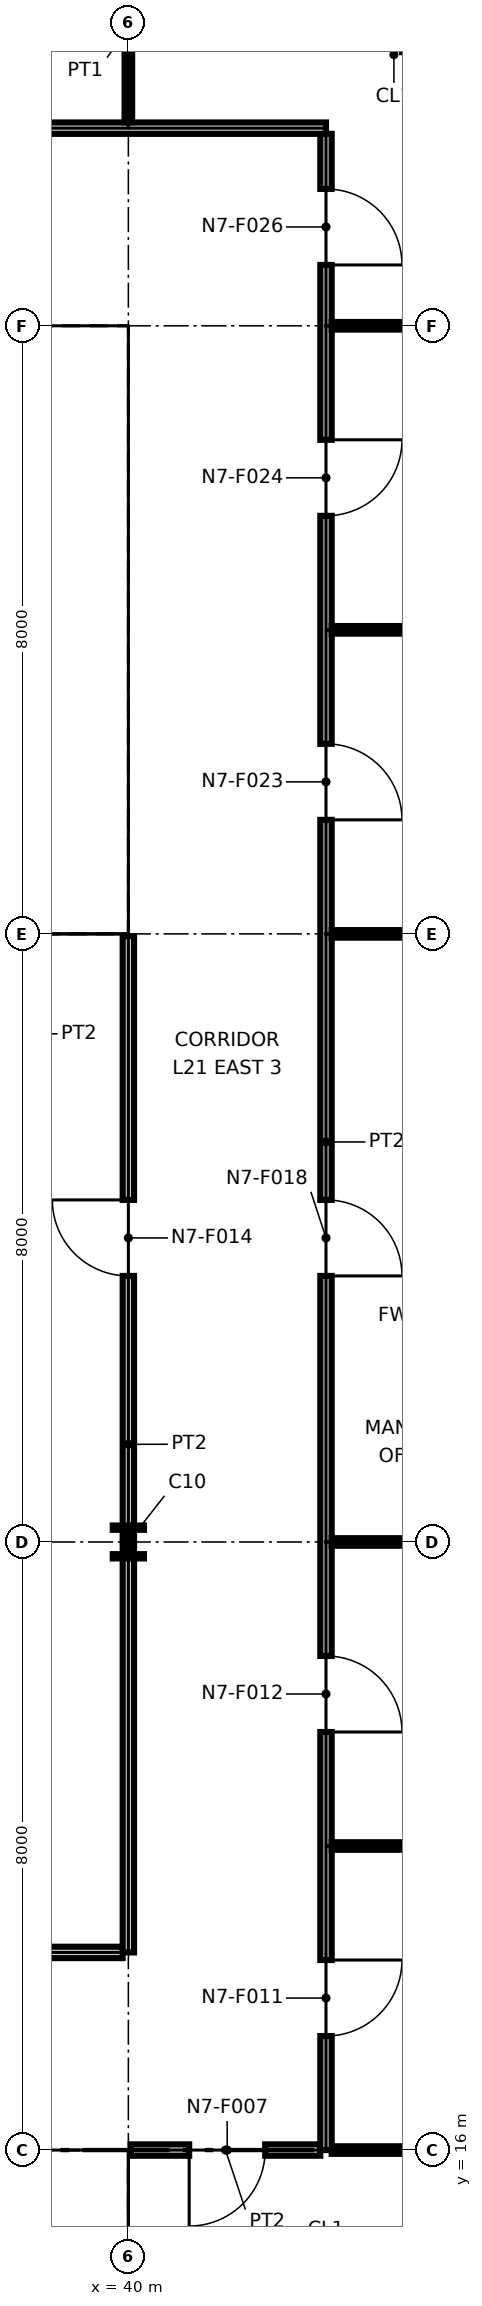
"""IFC4 building model, lengths in metres.
Left out: names, types, materials, properties, quantities, classifications, styles, units other than length and angle.
Written with IfcOpenShell. Run it as: python <this file> out.ifc"""

import sys

from ifc_helpers import new_model, si_unit, direction, frame, frame_2d, origin, origin_2d, place, context, subcontext, project, spatial, polyline, rectangle, i_section, outline, extrude, element, fill, save


model = new_model("IFC4")
c1 = context("Model", 3, precision=1e-05, world=origin(), true_north=direction((0.0, 1.0)))
c2 = subcontext(c1, "Body", "Model", "MODEL_VIEW")
j1 = project(units=[si_unit("LENGTHUNIT", "METRE"), si_unit("PLANEANGLEUNIT", "RADIAN")], contexts=[c1])
p1 = place(None, origin())
s1 = spatial("IfcSite", under=j1, at=p1, CompositionType="ELEMENT")
p2 = place(p1, origin())
s2 = spatial("IfcBuilding", under=s1, at=p2, CompositionType="ELEMENT")
p3 = place(p2, frame((0.0, 0.0, 109.6)))
s3 = spatial("IfcBuildingStorey", under=s2, at=p3, CompositionType="ELEMENT", Elevation=109.6)
p4 = place(p3, frame((40.0, 16.0, 0.0), z_axis=(0.0, 0.0, 1.0), x_axis=(1.0, 0.0, 0.0)))
e1 = element("IfcColumn", 1, at=p4, inside=s3, PredefinedType="COLUMN", context=c2, shape_type="SweptSolid", body=[
    extrude(i_section(OverallWidth=0.406, OverallDepth=0.417, WebThickness=0.03, FlangeThickness=0.048, at=origin_2d()), origin(), (0.0, 0.0, 1.0), 4.15),
])
p5 = place(p3, frame((40.0, 24.0, 0.0), z_axis=(0.0, 0.0, 1.0), x_axis=(1.0, 0.0, 0.0)))
e2 = element("IfcColumn", 2, at=p5, inside=s3, PredefinedType="COLUMN", context=c2, shape_type="SweptSolid", body=[
    extrude(i_section(OverallWidth=0.411, OverallDepth=0.434, WebThickness=0.036, FlangeThickness=0.057, at=origin_2d()), origin(), (0.0, 0.0, 1.0), 4.15),
])
for number, where, z_axis, x_axis in (
    (3, (40.0, 32.0, 0.0), (0.0, 0.0, 1.0), (1.0, 0.0, 0.0)),
    (4, (40.0, 40.0, 0.0), (0.0, 0.0, 1.0), (1.0, 0.0, 0.0)),
):
    element("IfcColumn", number, at=place(p3, frame(where, z_axis=z_axis, x_axis=x_axis)), inside=s3, PredefinedType="COLUMN", context=c2, shape_type="SweptSolid", body=[
        extrude(i_section(OverallWidth=0.257, OverallDepth=0.363, WebThickness=0.013, FlangeThickness=0.022, at=origin_2d()), origin(), (0.0, 0.0, 1.0), 4.15),
    ])
p6 = place(p3, frame((24.65, 15.25, 0.0), z_axis=(0.0, 0.0, 1.0), x_axis=(1.0, 0.0, 0.0)))
e5 = element("IfcWall", 5, at=p6, inside=s3, PredefinedType="PARTITIONING", context=c2, shape_type="SweptSolid", body=[
    extrude(outline(polyline([(0.0, 0.0), (14.7, 0.0), (14.7, 4.15), (7.489, 4.15), (7.488, 3.382), (7.212, 3.382), (7.211, 4.15), (0.0, 4.15), (0.0, 0.0)])), frame((0.0, 0.1, 0.0), z_axis=(0.0, -1.0, 0.0), x_axis=(1.0, 0.0, 0.0)), (0.0, 0.0, 1.0), 0.2),
])
p7 = place(p6, frame((2.85, 0.0, 0.0)))
e6 = element("IfcOpeningElement", 6, at=p7, cuts=e5, PredefinedType="OPENING", context=c2, shape_type="SweptSolid", body=[
    extrude(rectangle(XDim=1.8, YDim=2.1, at=frame_2d((0.9, 1.05))), frame((0.0, 0.11, 0.0), z_axis=(0.0, -1.0, 0.0), x_axis=(1.0, 0.0, 0.0)), (0.0, 0.0, 1.0), 0.22),
])
p8 = place(p6, frame((9.95, 0.0, 0.0), z_axis=(0.0, 0.0, 1.0), x_axis=(-1.0, 0.0, 0.0)))
e7 = element("IfcOpeningElement", 7, at=p8, cuts=e5, PredefinedType="OPENING", context=c2, shape_type="SweptSolid", body=[
    extrude(rectangle(XDim=1.4, YDim=2.1, at=frame_2d((0.7, 1.05))), frame((0.0, 0.11, 0.0), z_axis=(0.0, -1.0, 0.0), x_axis=(1.0, 0.0, 0.0)), (0.0, 0.0, 1.0), 0.22),
])
p9 = place(p6, frame((13.4, 0.0, 0.0), z_axis=(0.0, 0.0, 1.0), x_axis=(-1.0, 0.0, 0.0)))
e8 = element("IfcOpeningElement", 8, at=p9, cuts=e5, PredefinedType="OPENING", context=c2, shape_type="SweptSolid", body=[
    extrude(rectangle(XDim=1.4, YDim=2.1, at=frame_2d((0.7, 1.05))), frame((0.0, 0.11, 0.0), z_axis=(0.0, -1.0, 0.0), x_axis=(1.0, 0.0, 0.0)), (0.0, 0.0, 1.0), 0.22),
])
p10 = place(p3, frame((39.25, 8.85, 0.0), z_axis=(0.0, 0.0, 1.0), x_axis=(0.0, 1.0, 0.0)))
e9 = element("IfcWall", 9, at=p10, inside=s3, PredefinedType="PARTITIONING", context=c2, shape_type="SweptSolid", body=[
    extrude(rectangle(XDim=6.3, YDim=0.2, at=frame_2d((3.15, 0.0))), origin(), (0.0, 0.0, 1.0), 4.15),
])
p11 = place(p3, frame((24.65, 32.75, 0.0), z_axis=(0.0, 0.0, 1.0), x_axis=(1.0, 0.0, 0.0)))
e10 = element("IfcWall", 10, at=p11, inside=s3, PredefinedType="PARTITIONING", context=c2, shape_type="SweptSolid", body=[
    extrude(outline(polyline([(0.0, 0.0), (14.7, 0.0), (14.7, 4.15), (7.489, 4.15), (7.488, 3.382), (7.212, 3.382), (7.211, 4.15), (0.0, 4.15), (0.0, 0.0)])), frame((0.0, 0.1, 0.0), z_axis=(0.0, -1.0, 0.0), x_axis=(1.0, 0.0, 0.0)), (0.0, 0.0, 1.0), 0.2),
])
p12 = place(p11, frame((4.1, 0.0, 0.0)))
e11 = element("IfcOpeningElement", 11, at=p12, cuts=e10, PredefinedType="OPENING", context=c2, shape_type="SweptSolid", body=[
    extrude(rectangle(XDim=1.8, YDim=2.1, at=frame_2d((0.9, 1.05))), frame((0.0, 0.11, 0.0), z_axis=(0.0, -1.0, 0.0), x_axis=(1.0, 0.0, 0.0)), (0.0, 0.0, 1.0), 0.22),
])
p13 = place(p11, frame((8.55, 0.0, 0.0)))
e12 = element("IfcOpeningElement", 12, at=p13, cuts=e10, PredefinedType="OPENING", context=c2, shape_type="SweptSolid", body=[
    extrude(rectangle(XDim=1.4, YDim=2.1, at=frame_2d((0.7, 1.05))), frame((0.0, 0.11, 0.0), z_axis=(0.0, -1.0, 0.0), x_axis=(1.0, 0.0, 0.0)), (0.0, 0.0, 1.0), 0.22),
])
p14 = place(p11, frame((12.0, 0.0, 0.0)))
e13 = element("IfcOpeningElement", 13, at=p14, cuts=e10, PredefinedType="OPENING", context=c2, shape_type="SweptSolid", body=[
    extrude(rectangle(XDim=1.4, YDim=2.1, at=frame_2d((0.7, 1.05))), frame((0.0, 0.11, 0.0), z_axis=(0.0, -1.0, 0.0), x_axis=(1.0, 0.0, 0.0)), (0.0, 0.0, 1.0), 0.22),
])
p15 = place(p3, frame((24.65, 39.25, 0.0), z_axis=(0.0, 0.0, 1.0), x_axis=(1.0, 0.0, 0.0)))
e14 = element("IfcWall", 14, at=p15, inside=s3, PredefinedType="PARTITIONING", context=c2, shape_type="SweptSolid", body=[
    extrude(outline(polyline([(0.0, 0.0), (14.7, 0.0), (14.7, 4.15), (7.489, 4.15), (7.488, 3.382), (7.212, 3.382), (7.211, 4.15), (0.0, 4.15), (0.0, 0.0)])), frame((0.0, 0.1, 0.0), z_axis=(0.0, -1.0, 0.0), x_axis=(1.0, 0.0, 0.0)), (0.0, 0.0, 1.0), 0.2),
])
p16 = place(p3, frame((39.25, 32.85, 0.0), z_axis=(0.0, 0.0, 1.0), x_axis=(0.0, 1.0, 0.0)))
e15 = element("IfcWall", 15, at=p16, inside=s3, PredefinedType="PARTITIONING", context=c2, shape_type="SweptSolid", body=[
    extrude(rectangle(XDim=6.3, YDim=0.2, at=frame_2d((3.15, 0.0))), origin(), (0.0, 0.0, 1.0), 4.15),
])
p17 = place(p3, frame((40.03, 16.0, 0.0), z_axis=(0.0, 0.0, 1.0), x_axis=(1.0, 0.0, 0.0)))
e16 = element("IfcWall", 16, at=p17, inside=s3, PredefinedType="PARTITIONING", context=c2, shape_type="SweptSolid", body=[
    extrude(rectangle(XDim=2.495, YDim=0.15, at=frame_2d((1.248, 0.0))), origin(), (0.0, 0.0, 1.0), 3.194),
])
p18 = place(p17, frame((1.77, 0.0, 0.0), z_axis=(0.0, 0.0, 1.0), x_axis=(-1.0, 0.0, 0.0)))
e17 = element("IfcOpeningElement", 17, at=p18, cuts=e16, PredefinedType="OPENING", context=c2, shape_type="SweptSolid", body=[
    extrude(rectangle(XDim=1.0, YDim=2.1, at=frame_2d((0.5, 1.05))), frame((0.0, 0.085, 0.0), z_axis=(0.0, -1.0, 0.0), x_axis=(1.0, 0.0, 0.0)), (0.0, 0.0, 1.0), 0.17),
])
p19 = place(p3, frame((42.675, 16.0, 0.0), z_axis=(0.0, 0.0, 1.0), x_axis=(1.0, 0.0, 0.0)))
e18 = element("IfcWall", 18, at=p19, inside=s3, PredefinedType="PARTITIONING", context=c2, shape_type="SweptSolid", body=[
    extrude(rectangle(XDim=2.495, YDim=0.1, at=frame_2d((1.248, 0.0))), origin(), (0.0, 0.0, 1.0), 3.194),
])
p20 = place(p3, frame((42.6, 16.0, 0.0), z_axis=(0.0, 0.0, 1.0), x_axis=(0.0, 1.0, 0.0)))
e19 = element("IfcWall", 19, at=p20, inside=s3, PredefinedType="PARTITIONING", context=c2, shape_type="SweptSolid", body=[
    extrude(rectangle(XDim=26.525, YDim=0.15, at=frame_2d((13.262, 0.0))), origin(), (0.0, 0.0, 1.0), 3.194),
])
p21 = place(p20, frame((2.5, 0.0, 0.0), z_axis=(0.0, 0.0, 1.0), x_axis=(-1.0, 0.0, 0.0)))
e20 = element("IfcOpeningElement", 20, at=p21, cuts=e19, PredefinedType="OPENING", context=c2, shape_type="SweptSolid", body=[
    extrude(rectangle(XDim=1.0, YDim=2.1, at=frame_2d((0.5, 1.05))), frame((0.0, 0.085, 0.0), z_axis=(0.0, -1.0, 0.0), x_axis=(1.0, 0.0, 0.0)), (0.0, 0.0, 1.0), 0.17),
])
p22 = place(p20, frame((6.5, 0.0, 0.0), z_axis=(0.0, 0.0, 1.0), x_axis=(-1.0, 0.0, 0.0)))
e21 = element("IfcOpeningElement", 21, at=p22, cuts=e19, PredefinedType="OPENING", context=c2, shape_type="SweptSolid", body=[
    extrude(rectangle(XDim=1.0, YDim=2.1, at=frame_2d((0.5, 1.05))), frame((0.0, 0.085, 0.0), z_axis=(0.0, -1.0, 0.0), x_axis=(1.0, 0.0, 0.0)), (0.0, 0.0, 1.0), 0.17),
])
p23 = place(p20, frame((12.5, 0.0, 0.0), z_axis=(0.0, 0.0, 1.0), x_axis=(-1.0, 0.0, 0.0)))
e22 = element("IfcOpeningElement", 22, at=p23, cuts=e19, PredefinedType="OPENING", context=c2, shape_type="SweptSolid", body=[
    extrude(rectangle(XDim=1.0, YDim=2.1, at=frame_2d((0.5, 1.05))), frame((0.0, 0.085, 0.0), z_axis=(0.0, -1.0, 0.0), x_axis=(1.0, 0.0, 0.0)), (0.0, 0.0, 1.0), 0.17),
])
p24 = place(p20, frame((18.5, 0.0, 0.0), z_axis=(0.0, 0.0, 1.0), x_axis=(-1.0, 0.0, 0.0)))
e23 = element("IfcOpeningElement", 23, at=p24, cuts=e19, PredefinedType="OPENING", context=c2, shape_type="SweptSolid", body=[
    extrude(rectangle(XDim=1.0, YDim=2.1, at=frame_2d((0.5, 1.05))), frame((0.0, 0.085, 0.0), z_axis=(0.0, -1.0, 0.0), x_axis=(1.0, 0.0, 0.0)), (0.0, 0.0, 1.0), 0.17),
])
p25 = place(p20, frame((22.5, 0.0, 0.0), z_axis=(0.0, 0.0, 1.0), x_axis=(-1.0, 0.0, 0.0)))
e24 = element("IfcOpeningElement", 24, at=p25, cuts=e19, PredefinedType="OPENING", context=c2, shape_type="SweptSolid", body=[
    extrude(rectangle(XDim=1.0, YDim=2.1, at=frame_2d((0.5, 1.05))), frame((0.0, 0.085, 0.0), z_axis=(0.0, -1.0, 0.0), x_axis=(1.0, 0.0, 0.0)), (0.0, 0.0, 1.0), 0.17),
])
p26 = place(p20, frame((25.8, 0.0, 0.0), z_axis=(0.0, 0.0, 1.0), x_axis=(-1.0, 0.0, 0.0)))
e25 = element("IfcOpeningElement", 25, at=p26, cuts=e19, PredefinedType="OPENING", context=c2, shape_type="SweptSolid", body=[
    extrude(rectangle(XDim=1.0, YDim=2.1, at=frame_2d((0.5, 1.05))), frame((0.0, 0.085, 0.0), z_axis=(0.0, -1.0, 0.0), x_axis=(1.0, 0.0, 0.0)), (0.0, 0.0, 1.0), 0.17),
])
p27 = place(p3, frame((26.675, 18.6, 0.0), z_axis=(0.0, 0.0, 1.0), x_axis=(1.0, 0.0, 0.0)))
e26 = element("IfcWall", 26, at=p27, inside=s3, PredefinedType="PARTITIONING", context=c2, shape_type="SweptSolid", body=[
    extrude(rectangle(XDim=13.25, YDim=0.15, at=frame_2d((6.625, 0.0))), origin(), (0.0, 0.0, 1.0), 3.194),
])
p28 = place(p27, frame((2.325, 0.0, 0.0)))
e27 = element("IfcOpeningElement", 27, at=p28, cuts=e26, PredefinedType="OPENING", context=c2, shape_type="SweptSolid", body=[
    extrude(rectangle(XDim=1.0, YDim=2.1, at=frame_2d((0.5, 1.05))), frame((0.0, 0.085, 0.0), z_axis=(0.0, -1.0, 0.0), x_axis=(1.0, 0.0, 0.0)), (0.0, 0.0, 1.0), 0.17),
])
p29 = place(p3, frame((40.0, 18.6, 0.0), z_axis=(0.0, 0.0, 1.0), x_axis=(0.0, 1.0, 0.0)))
e28 = element("IfcWall", 28, at=p29, inside=s3, PredefinedType="PARTITIONING", context=c2, shape_type="SweptSolid", body=[
    extrude(rectangle(XDim=13.37, YDim=0.15, at=frame_2d((6.685, 0.0))), origin(), (0.0, 0.0, 1.0), 3.194),
])
p30 = place(p29, frame((8.9, 0.0, 0.0)))
e29 = element("IfcOpeningElement", 29, at=p30, cuts=e28, PredefinedType="OPENING", context=c2, shape_type="SweptSolid", body=[
    extrude(rectangle(XDim=1.0, YDim=2.1, at=frame_2d((0.5, 1.05))), frame((0.0, 0.085, 0.0), z_axis=(0.0, -1.0, 0.0), x_axis=(1.0, 0.0, 0.0)), (0.0, 0.0, 1.0), 0.17),
])
p31 = place(p3, frame((42.675, 20.0, 0.0), z_axis=(0.0, 0.0, 1.0), x_axis=(1.0, 0.0, 0.0)))
e30 = element("IfcWall", 30, at=p31, inside=s3, PredefinedType="PARTITIONING", context=c2, shape_type="SweptSolid", body=[
    extrude(rectangle(XDim=5.195, YDim=0.1, at=frame_2d((2.598, 0.0))), origin(), (0.0, 0.0, 1.0), 3.194),
])
for number, where, z_axis, x_axis in (
    (31, (42.675, 24.0, 0.0), (0.0, 0.0, 1.0), (1.0, 0.0, 0.0)),
    (32, (42.675, 32.0, 0.0), (0.0, 0.0, 1.0), (1.0, 0.0, 0.0)),
):
    element("IfcWall", number, at=place(p3, frame(where, z_axis=z_axis, x_axis=x_axis)), inside=s3, PredefinedType="PARTITIONING", context=c2, shape_type="SweptSolid", body=[
        extrude(rectangle(XDim=2.495, YDim=0.1, at=frame_2d((1.248, 0.0))), origin(), (0.0, 0.0, 1.0), 3.194),
    ])
for number, where, z_axis, x_axis in (
    (33, (42.675, 36.0, 0.0), (0.0, 0.0, 1.0), (1.0, 0.0, 0.0)),
    (34, (42.675, 40.0, 0.0), (0.0, 0.0, 1.0), (1.0, 0.0, 0.0)),
):
    element("IfcWall", number, at=place(p3, frame(where, z_axis=z_axis, x_axis=x_axis)), inside=s3, PredefinedType="PARTITIONING", context=c2, shape_type="SweptSolid", body=[
        extrude(rectangle(XDim=5.195, YDim=0.1, at=frame_2d((2.598, 0.0))), origin(), (0.0, 0.0, 1.0), 3.194),
    ])
p32 = place(p3, frame((8.05, 42.6, 0.0), z_axis=(0.0, 0.0, 1.0), x_axis=(1.0, 0.0, 0.0)))
e35 = element("IfcWall", 35, at=p32, inside=s3, PredefinedType="PARTITIONING", context=c2, shape_type="SweptSolid", body=[
    extrude(rectangle(XDim=34.55, YDim=0.15, at=frame_2d((17.275, 0.0))), origin(), (0.0, 0.0, 1.0), 3.194),
])
p33 = place(p32, frame((9.45, 0.0, 0.0)))
e36 = element("IfcOpeningElement", 36, at=p33, cuts=e35, PredefinedType="OPENING", context=c2, shape_type="SweptSolid", body=[
    extrude(rectangle(XDim=1.0, YDim=2.1, at=frame_2d((0.5, 1.05))), frame((0.0, 0.085, 0.0), z_axis=(0.0, -1.0, 0.0), x_axis=(1.0, 0.0, 0.0)), (0.0, 0.0, 1.0), 0.17),
])
p34 = place(p32, frame((13.45, 0.0, 0.0)))
e37 = element("IfcOpeningElement", 37, at=p34, cuts=e35, PredefinedType="OPENING", context=c2, shape_type="SweptSolid", body=[
    extrude(rectangle(XDim=1.0, YDim=2.1, at=frame_2d((0.5, 1.05))), frame((0.0, 0.085, 0.0), z_axis=(0.0, -1.0, 0.0), x_axis=(1.0, 0.0, 0.0)), (0.0, 0.0, 1.0), 0.17),
])
p35 = place(p32, frame((25.45, 0.0, 0.0)))
e38 = element("IfcOpeningElement", 38, at=p35, cuts=e35, PredefinedType="OPENING", context=c2, shape_type="SweptSolid", body=[
    extrude(rectangle(XDim=1.0, YDim=2.1, at=frame_2d((0.5, 1.05))), frame((0.0, 0.085, 0.0), z_axis=(0.0, -1.0, 0.0), x_axis=(1.0, 0.0, 0.0)), (0.0, 0.0, 1.0), 0.17),
])
p36 = place(p32, frame((29.45, 0.0, 0.0)))
e39 = element("IfcOpeningElement", 39, at=p36, cuts=e35, PredefinedType="OPENING", context=c2, shape_type="SweptSolid", body=[
    extrude(rectangle(XDim=1.0, YDim=2.1, at=frame_2d((0.5, 1.05))), frame((0.0, 0.085, 0.0), z_axis=(0.0, -1.0, 0.0), x_axis=(1.0, 0.0, 0.0)), (0.0, 0.0, 1.0), 0.17),
])
p37 = place(p32, frame((1.45, 0.0, 0.0)))
e40 = element("IfcOpeningElement", 40, at=p37, cuts=e35, PredefinedType="OPENING", context=c2, shape_type="SweptSolid", body=[
    extrude(rectangle(XDim=1.0, YDim=2.1, at=frame_2d((0.5, 1.05))), frame((0.0, 0.085, 0.0), z_axis=(0.0, -1.0, 0.0), x_axis=(1.0, 0.0, 0.0)), (0.0, 0.0, 1.0), 0.17),
])
p38 = place(p32, frame((5.45, 0.0, 0.0)))
e41 = element("IfcOpeningElement", 41, at=p38, cuts=e35, PredefinedType="OPENING", context=c2, shape_type="SweptSolid", body=[
    extrude(rectangle(XDim=1.0, YDim=2.1, at=frame_2d((0.5, 1.05))), frame((0.0, 0.085, 0.0), z_axis=(0.0, -1.0, 0.0), x_axis=(1.0, 0.0, 0.0)), (0.0, 0.0, 1.0), 0.17),
])
p39 = place(p32, frame((17.45, 0.0, 0.0)))
e42 = element("IfcOpeningElement", 42, at=p39, cuts=e35, PredefinedType="OPENING", context=c2, shape_type="SweptSolid", body=[
    extrude(rectangle(XDim=1.0, YDim=2.1, at=frame_2d((0.5, 1.05))), frame((0.0, 0.085, 0.0), z_axis=(0.0, -1.0, 0.0), x_axis=(1.0, 0.0, 0.0)), (0.0, 0.0, 1.0), 0.17),
])
p40 = place(p32, frame((21.45, 0.0, 0.0)))
e43 = element("IfcOpeningElement", 43, at=p40, cuts=e35, PredefinedType="OPENING", context=c2, shape_type="SweptSolid", body=[
    extrude(rectangle(XDim=1.0, YDim=2.1, at=frame_2d((0.5, 1.05))), frame((0.0, 0.085, 0.0), z_axis=(0.0, -1.0, 0.0), x_axis=(1.0, 0.0, 0.0)), (0.0, 0.0, 1.0), 0.17),
])
p41 = place(p3, frame((40.0, 42.675, 0.0), z_axis=(0.0, 0.0, 1.0), x_axis=(0.0, 1.0, 0.0)))
e44 = element("IfcWall", 44, at=p41, inside=s3, PredefinedType="PARTITIONING", context=c2, shape_type="SweptSolid", body=[
    extrude(rectangle(XDim=2.495, YDim=0.1, at=frame_2d((1.248, 0.0))), origin(), (0.0, 0.0, 1.0), 3.194),
])
p42 = place(p18, origin())
e45 = element("IfcDoor", 45, at=p42, inside=s3, OperationType="SINGLE_SWING_RIGHT", PredefinedType="DOOR", context=c2, shape_type="SweptSolid", body=[
    extrude(rectangle(XDim=1.0, YDim=2.1, at=frame_2d((0.5, 1.05))), frame((0.0, 0.025, 0.0), z_axis=(0.0, -1.0, 0.0), x_axis=(1.0, 0.0, 0.0)), (0.0, 0.0, 1.0), 0.05),
])
fill(e17, e45)
p43 = place(p21, origin())
e46 = element("IfcDoor", 46, at=p43, inside=s3, OperationType="SINGLE_SWING_LEFT", PredefinedType="DOOR", context=c2, shape_type="SweptSolid", body=[
    extrude(rectangle(XDim=1.0, YDim=2.1, at=frame_2d((0.5, 1.05))), frame((0.0, 0.025, 0.0), z_axis=(0.0, -1.0, 0.0), x_axis=(1.0, 0.0, 0.0)), (0.0, 0.0, 1.0), 0.05),
])
fill(e20, e46)
p44 = place(p22, origin())
e47 = element("IfcDoor", 47, at=p44, inside=s3, OperationType="SINGLE_SWING_RIGHT", PredefinedType="DOOR", context=c2, shape_type="SweptSolid", body=[
    extrude(rectangle(XDim=1.0, YDim=2.1, at=frame_2d((0.5, 1.05))), frame((0.0, 0.025, 0.0), z_axis=(0.0, -1.0, 0.0), x_axis=(1.0, 0.0, 0.0)), (0.0, 0.0, 1.0), 0.05),
])
fill(e21, e47)
p45 = place(p30, origin())
e48 = element("IfcDoor", 48, at=p45, inside=s3, OperationType="SINGLE_SWING_RIGHT", PredefinedType="DOOR", context=c2, shape_type="SweptSolid", body=[
    extrude(rectangle(XDim=1.0, YDim=2.1, at=frame_2d((0.5, 1.05))), frame((0.0, 0.025, 0.0), z_axis=(0.0, -1.0, 0.0), x_axis=(1.0, 0.0, 0.0)), (0.0, 0.0, 1.0), 0.05),
])
fill(e29, e48)
p46 = place(p23, origin())
e49 = element("IfcDoor", 49, at=p46, inside=s3, OperationType="SINGLE_SWING_RIGHT", PredefinedType="DOOR", context=c2, shape_type="SweptSolid", body=[
    extrude(rectangle(XDim=1.0, YDim=2.1, at=frame_2d((0.5, 1.05))), frame((0.0, 0.025, 0.0), z_axis=(0.0, -1.0, 0.0), x_axis=(1.0, 0.0, 0.0)), (0.0, 0.0, 1.0), 0.05),
])
fill(e22, e49)
p47 = place(p24, origin())
e50 = element("IfcDoor", 50, at=p47, inside=s3, OperationType="SINGLE_SWING_RIGHT", PredefinedType="DOOR", context=c2, shape_type="SweptSolid", body=[
    extrude(rectangle(XDim=1.0, YDim=2.1, at=frame_2d((0.5, 1.05))), frame((0.0, 0.025, 0.0), z_axis=(0.0, -1.0, 0.0), x_axis=(1.0, 0.0, 0.0)), (0.0, 0.0, 1.0), 0.05),
])
fill(e23, e50)
p48 = place(p25, origin())
e51 = element("IfcDoor", 51, at=p48, inside=s3, OperationType="SINGLE_SWING_LEFT", PredefinedType="DOOR", context=c2, shape_type="SweptSolid", body=[
    extrude(rectangle(XDim=1.0, YDim=2.1, at=frame_2d((0.5, 1.05))), frame((0.0, 0.025, 0.0), z_axis=(0.0, -1.0, 0.0), x_axis=(1.0, 0.0, 0.0)), (0.0, 0.0, 1.0), 0.05),
])
fill(e24, e51)
p49 = place(p26, origin())
e52 = element("IfcDoor", 52, at=p49, inside=s3, OperationType="SINGLE_SWING_RIGHT", PredefinedType="DOOR", context=c2, shape_type="SweptSolid", body=[
    extrude(rectangle(XDim=1.0, YDim=2.1, at=frame_2d((0.5, 1.05))), frame((0.0, 0.025, 0.0), z_axis=(0.0, -1.0, 0.0), x_axis=(1.0, 0.0, 0.0)), (0.0, 0.0, 1.0), 0.05),
])
fill(e25, e52)
save(model, sys.argv[1])
